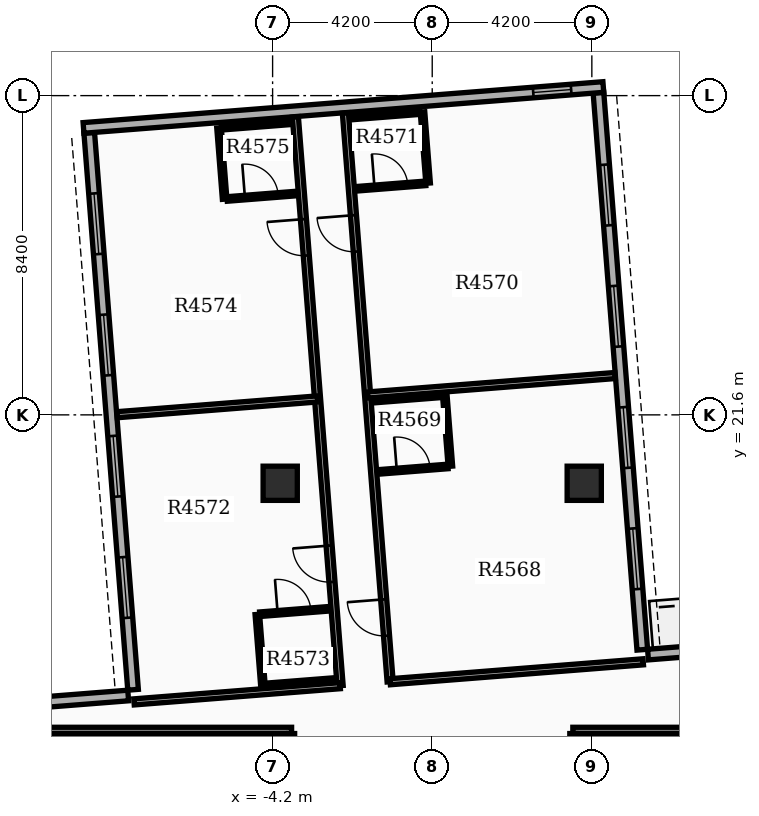
"""IFC4 building model, lengths in metres.
Left out: names, types, materials, properties, quantities, classifications, styles, units other than length and angle.
Written with IfcOpenShell. Run it as: python <this file> out.ifc"""

import sys

from ifc_helpers import new_model, si_unit, direction, frame, frame_2d, origin, origin_2d, place, context, subcontext, project, spatial, rectangle, circle, extrude, element, fill, save


model = new_model("IFC4")
c1 = context("Model", 3, precision=1e-05, world=origin(), true_north=direction((0.0, 1.0)))
c2 = subcontext(c1, "Body", "Model", "MODEL_VIEW")
j1 = project(units=[si_unit("LENGTHUNIT", "METRE"), si_unit("PLANEANGLEUNIT", "RADIAN")], contexts=[c1])
p1 = place(None, origin())
s1 = spatial("IfcSite", under=j1, at=p1, CompositionType="ELEMENT")
p2 = place(p1, origin())
s2 = spatial("IfcBuilding", under=s1, at=p2, CompositionType="ELEMENT")
p3 = place(p2, frame((0.0, 0.0, 285.0)))
s3 = spatial("IfcBuildingStorey", under=s2, at=p3, CompositionType="ELEMENT", Elevation=285.0)
for number, where, z_axis, x_axis in (
    (1, (-4.0, 19.8, 0.0), (0.0, 0.0, 1.0), (1.0, 0.0, 0.0)),
    (2, (4.0, 19.8, 0.0), (0.0, 0.0, 1.0), (1.0, 0.0, 0.0)),
):
    element("IfcColumn", number, at=place(p3, frame(where, z_axis=z_axis, x_axis=x_axis)), inside=s3, PredefinedType="COLUMN", context=c2, shape_type="SweptSolid", body=[
        extrude(circle(Radius=0.45, at=origin_2d()), origin(), (0.0, 0.0, 1.0), 3.9),
    ])
p4 = place(p3, frame((5.527, 15.421, 0.0), z_axis=(0.0, 0.0, 1.0), x_axis=(-0.078456642068, 0.996917526837, 0.0)))
e3 = element("IfcWall", 3, at=p4, inside=s3, PredefinedType="STANDARD", context=c2, shape_type="SweptSolid", body=[
    extrude(rectangle(XDim=14.7, YDim=0.28, at=frame_2d((7.35, 0.0))), origin(), (0.0, 0.0, 1.0), 3.13),
])
p5 = place(p4, frame((1.6, 0.0, 0.8)))
e4 = element("IfcOpeningElement", 4, at=p5, cuts=e3, PredefinedType="OPENING", context=c2, shape_type="SweptSolid", body=[
    extrude(rectangle(XDim=1.6, YDim=1.7, at=frame_2d((0.8, 0.85))), frame((0.0, 0.15, 0.0), z_axis=(0.0, -1.0, 0.0), x_axis=(1.0, 0.0, 0.0)), (0.0, 0.0, 1.0), 0.3),
])
p6 = place(p4, frame((4.8, 0.0, 0.8)))
e5 = element("IfcOpeningElement", 5, at=p6, cuts=e3, PredefinedType="OPENING", context=c2, shape_type="SweptSolid", body=[
    extrude(rectangle(XDim=1.6, YDim=1.7, at=frame_2d((0.8, 0.85))), frame((0.0, 0.15, 0.0), z_axis=(0.0, -1.0, 0.0), x_axis=(1.0, 0.0, 0.0)), (0.0, 0.0, 1.0), 0.3),
])
p7 = place(p4, frame((8.0, 0.0, 0.8)))
e6 = element("IfcOpeningElement", 6, at=p7, cuts=e3, PredefinedType="OPENING", context=c2, shape_type="SweptSolid", body=[
    extrude(rectangle(XDim=1.6, YDim=1.7, at=frame_2d((0.8, 0.85))), frame((0.0, 0.15, 0.0), z_axis=(0.0, -1.0, 0.0), x_axis=(1.0, 0.0, 0.0)), (0.0, 0.0, 1.0), 0.3),
])
p8 = place(p4, frame((11.2, 0.0, 0.8)))
e7 = element("IfcOpeningElement", 7, at=p8, cuts=e3, PredefinedType="OPENING", context=c2, shape_type="SweptSolid", body=[
    extrude(rectangle(XDim=1.6, YDim=1.7, at=frame_2d((0.8, 0.85))), frame((0.0, 0.15, 0.0), z_axis=(0.0, -1.0, 0.0), x_axis=(1.0, 0.0, 0.0)), (0.0, 0.0, 1.0), 0.3),
])
p9 = place(p3, frame((-9.025, 29.021, 0.0), z_axis=(0.0, 0.0, 1.0), x_axis=(0.078456642068, -0.996917526837, 0.0)))
e8 = element("IfcWall", 8, at=p9, inside=s3, PredefinedType="STANDARD", context=c2, shape_type="SweptSolid", body=[
    extrude(rectangle(XDim=14.7, YDim=0.28, at=frame_2d((7.35, 0.0))), origin(), (0.0, 0.0, 1.0), 3.13),
])
p10 = place(p9, frame((1.6, 0.0, 0.8)))
e9 = element("IfcOpeningElement", 9, at=p10, cuts=e8, PredefinedType="OPENING", context=c2, shape_type="SweptSolid", body=[
    extrude(rectangle(XDim=1.6, YDim=1.7, at=frame_2d((0.8, 0.85))), frame((0.0, 0.15, 0.0), z_axis=(0.0, -1.0, 0.0), x_axis=(1.0, 0.0, 0.0)), (0.0, 0.0, 1.0), 0.3),
])
p11 = place(p9, frame((4.8, 0.0, 0.8)))
e10 = element("IfcOpeningElement", 10, at=p11, cuts=e8, PredefinedType="OPENING", context=c2, shape_type="SweptSolid", body=[
    extrude(rectangle(XDim=1.6, YDim=1.7, at=frame_2d((0.8, 0.85))), frame((0.0, 0.15, 0.0), z_axis=(0.0, -1.0, 0.0), x_axis=(1.0, 0.0, 0.0)), (0.0, 0.0, 1.0), 0.3),
])
p12 = place(p9, frame((8.0, 0.0, 0.8)))
e11 = element("IfcOpeningElement", 11, at=p12, cuts=e8, PredefinedType="OPENING", context=c2, shape_type="SweptSolid", body=[
    extrude(rectangle(XDim=1.6, YDim=1.7, at=frame_2d((0.8, 0.85))), frame((0.0, 0.15, 0.0), z_axis=(0.0, -1.0, 0.0), x_axis=(1.0, 0.0, 0.0)), (0.0, 0.0, 1.0), 0.3),
])
p13 = place(p9, frame((11.2, 0.0, 0.8)))
e12 = element("IfcOpeningElement", 12, at=p13, cuts=e8, PredefinedType="OPENING", context=c2, shape_type="SweptSolid", body=[
    extrude(rectangle(XDim=1.6, YDim=1.7, at=frame_2d((0.8, 0.85))), frame((0.0, 0.15, 0.0), z_axis=(0.0, -1.0, 0.0), x_axis=(1.0, 0.0, 0.0)), (0.0, 0.0, 1.0), 0.3),
])
p14 = place(p3, frame((4.502, 30.226, 0.0), z_axis=(0.0, 0.0, 1.0), x_axis=(-0.996917480881, -0.078457226018, 0.0)))
e13 = element("IfcWall", 13, at=p14, inside=s3, PredefinedType="STANDARD", context=c2, shape_type="SweptSolid", body=[
    extrude(rectangle(XDim=13.72, YDim=0.28, at=frame_2d((6.86, 0.0))), origin(), (0.0, 0.0, 1.0), 3.13),
])
p15 = place(p14, frame((0.85, 0.0, 0.85)))
e14 = element("IfcOpeningElement", 14, at=p15, cuts=e13, PredefinedType="OPENING", context=c2, shape_type="SweptSolid", body=[
    extrude(rectangle(XDim=1.0, YDim=1.5, at=frame_2d((0.5, 0.75))), frame((0.0, 0.15, 0.0), z_axis=(0.0, -1.0, 0.0), x_axis=(1.0, 0.0, 0.0)), (0.0, 0.0, 1.0), 0.3),
])
p16 = place(p3, frame((11.958, 15.787, 0.0), z_axis=(0.0, 0.0, 1.0), x_axis=(-0.996916125428, -0.078474447191, 0.0)))
e15 = element("IfcWall", 15, at=p16, inside=s3, PredefinedType="STANDARD", context=c2, shape_type="SweptSolid", body=[
    extrude(rectangle(XDim=6.3, YDim=0.28, at=frame_2d((3.15, 0.0))), origin(), (0.0, 0.0, 1.0), 3.13),
])
p17 = place(p3, frame((-14.281, 13.722, 0.0), z_axis=(0.0, 0.0, 1.0), x_axis=(0.99691915642, 0.078435932851, 0.0)))
e16 = element("IfcWall", 16, at=p17, inside=s3, PredefinedType="STANDARD", context=c2, shape_type="SweptSolid", body=[
    extrude(rectangle(XDim=6.3, YDim=0.28, at=frame_2d((3.15, 0.0))), origin(), (0.0, 0.0, 1.0), 3.13),
])
p18 = place(p3, frame((-11.0, 13.3, 0.0), z_axis=(0.0, 0.0, 1.0), x_axis=(1.0, 0.0, 0.0)))
e17 = element("IfcWall", 17, at=p18, inside=s3, PredefinedType="PARTITIONING", context=c2, shape_type="SweptSolid", body=[
    extrude(rectangle(XDim=7.3, YDim=0.16, at=frame_2d((3.65, 0.0))), origin(), (0.0, 0.0, 1.0), 3.12),
])
p19 = place(p3, frame((-3.7, 11.285, 0.0), z_axis=(0.0, 0.0, 1.0), x_axis=(0.0, 1.0, 0.0)))
e18 = element("IfcWall", 18, at=p19, inside=s3, PredefinedType="PARTITIONING", context=c2, shape_type="SweptSolid", body=[
    extrude(rectangle(XDim=1.93, YDim=0.16, at=frame_2d((0.965, 0.0))), origin(), (0.0, 0.0, 1.0), 3.12),
])
p20 = place(p3, frame((3.7, 13.3, 0.0), z_axis=(0.0, 0.0, 1.0), x_axis=(1.0, 0.0, 0.0)))
e19 = element("IfcWall", 19, at=p20, inside=s3, PredefinedType="PARTITIONING", context=c2, shape_type="SweptSolid", body=[
    extrude(rectangle(XDim=7.3, YDim=0.16, at=frame_2d((3.65, 0.0))), origin(), (0.0, 0.0, 1.0), 3.12),
])
p21 = place(p3, frame((3.7, 11.285, 0.0), z_axis=(0.0, 0.0, 1.0), x_axis=(0.0, 1.0, 0.0)))
e20 = element("IfcWall", 20, at=p21, inside=s3, PredefinedType="PARTITIONING", context=c2, shape_type="SweptSolid", body=[
    extrude(rectangle(XDim=1.93, YDim=0.16, at=frame_2d((0.965, 0.0))), origin(), (0.0, 0.0, 1.0), 3.12),
])
p22 = place(p3, frame((-1.107, 14.578, 0.0), z_axis=(0.0, 0.0, 1.0), x_axis=(-0.078453666116, 0.996917761038, 0.0)))
e21 = element("IfcWall", 21, at=p22, inside=s3, PredefinedType="PARTITIONING", context=c2, shape_type="SweptSolid", body=[
    extrude(rectangle(XDim=15.012, YDim=0.16, at=frame_2d((7.506, 0.0))), origin(), (0.0, 0.0, 1.0), 3.12),
])
p23 = place(p22, frame((1.214, 0.0, 0.0)))
e22 = element("IfcOpeningElement", 22, at=p23, cuts=e21, PredefinedType="OPENING", context=c2, shape_type="SweptSolid", body=[
    extrude(rectangle(XDim=0.96, YDim=2.15, at=frame_2d((0.48, 1.075))), frame((0.0, 0.09, 0.0), z_axis=(0.0, -1.0, 0.0), x_axis=(1.0, 0.0, 0.0)), (0.0, 0.0, 1.0), 0.18),
])
p24 = place(p22, frame((11.353, 0.0, 0.0)))
e23 = element("IfcOpeningElement", 23, at=p24, cuts=e21, PredefinedType="OPENING", context=c2, shape_type="SweptSolid", body=[
    extrude(rectangle(XDim=0.96, YDim=2.15, at=frame_2d((0.48, 1.075))), frame((0.0, 0.09, 0.0), z_axis=(0.0, -1.0, 0.0), x_axis=(1.0, 0.0, 0.0)), (0.0, 0.0, 1.0), 0.18),
])
p25 = place(p3, frame((-1.107, 14.578, 0.0), z_axis=(0.0, 0.0, 1.0), x_axis=(0.996916608894, 0.07846830514, 0.0)))
e24 = element("IfcWall", 24, at=p25, inside=s3, PredefinedType="PARTITIONING", context=c2, shape_type="SweptSolid", body=[
    extrude(rectangle(XDim=6.68, YDim=0.16, at=frame_2d((3.34, 0.0))), origin(), (0.0, 0.0, 1.0), 3.12),
])
p26 = place(p3, frame((-1.701, 22.123, 0.0), z_axis=(0.0, 0.0, 1.0), x_axis=(0.996917719405, 0.07845419515, 0.0)))
e25 = element("IfcWall", 25, at=p26, inside=s3, PredefinedType="PARTITIONING", context=c2, shape_type="SweptSolid", body=[
    extrude(rectangle(XDim=6.532, YDim=0.16, at=frame_2d((3.266, 0.0))), origin(), (0.0, 0.0, 1.0), 3.12),
])
p27 = place(p3, frame((-1.401, 20.1, 0.0), z_axis=(0.0, 0.0, 1.0), x_axis=(0.996916400774, 0.0784709492, 0.0)))
e26 = element("IfcWall", 26, at=p27, inside=s3, PredefinedType="PARTITIONING", context=c2, shape_type="SweptSolid", body=[
    extrude(rectangle(XDim=1.82, YDim=0.12, at=frame_2d((0.91, 0.0))), origin(), (0.0, 0.0, 1.0), 3.12),
])
p28 = place(p27, frame((0.47, 0.0, 0.0)))
e27 = element("IfcOpeningElement", 27, at=p28, cuts=e26, PredefinedType="OPENING", context=c2, shape_type="SweptSolid", body=[
    extrude(rectangle(XDim=0.88, YDim=2.1, at=frame_2d((0.44, 1.05))), frame((0.0, 0.07, 0.0), z_axis=(0.0, -1.0, 0.0), x_axis=(1.0, 0.0, 0.0)), (0.0, 0.0, 1.0), 0.14),
])
p29 = place(p3, frame((-1.549, 21.974, 0.0), z_axis=(0.0, 0.0, 1.0), x_axis=(0.996915574626, 0.078481444107, 0.0)))
e28 = element("IfcWall", 28, at=p29, inside=s3, PredefinedType="PARTITIONING", context=c2, shape_type="SweptSolid", body=[
    extrude(rectangle(XDim=1.82, YDim=0.12, at=frame_2d((0.91, 0.0))), origin(), (0.0, 0.0, 1.0), 3.12),
])
p30 = place(p3, frame((0.478, 20.248, 0.0), z_axis=(0.0, 0.0, 1.0), x_axis=(-0.07843418698, 0.996919293781, 0.0)))
e29 = element("IfcWall", 29, at=p30, inside=s3, PredefinedType="PARTITIONING", context=c2, shape_type="SweptSolid", body=[
    extrude(rectangle(XDim=1.88, YDim=0.12, at=frame_2d((0.94, 0.0))), origin(), (0.0, 0.0, 1.0), 3.12),
])
p31 = place(p3, frame((-1.988, 27.549, 0.0), z_axis=(0.0, 0.0, 1.0), x_axis=(0.996916400774, 0.0784709492, 0.0)))
e30 = element("IfcWall", 30, at=p31, inside=s3, PredefinedType="PARTITIONING", context=c2, shape_type="SweptSolid", body=[
    extrude(rectangle(XDim=1.82, YDim=0.12, at=frame_2d((0.91, 0.0))), origin(), (0.0, 0.0, 1.0), 3.12),
])
p32 = place(p31, frame((0.47, 0.0, 0.0)))
e31 = element("IfcOpeningElement", 31, at=p32, cuts=e30, PredefinedType="OPENING", context=c2, shape_type="SweptSolid", body=[
    extrude(rectangle(XDim=0.88, YDim=2.1, at=frame_2d((0.44, 1.05))), frame((0.0, 0.07, 0.0), z_axis=(0.0, -1.0, 0.0), x_axis=(1.0, 0.0, 0.0)), (0.0, 0.0, 1.0), 0.14),
])
p33 = place(p3, frame((-2.135, 29.423, 0.0), z_axis=(0.0, 0.0, 1.0), x_axis=(0.996915574626, 0.078481444107, 0.0)))
e32 = element("IfcWall", 32, at=p33, inside=s3, PredefinedType="PARTITIONING", context=c2, shape_type="SweptSolid", body=[
    extrude(rectangle(XDim=1.82, YDim=0.12, at=frame_2d((0.91, 0.0))), origin(), (0.0, 0.0, 1.0), 3.12),
])
p34 = place(p3, frame((-0.108, 27.697, 0.0), z_axis=(0.0, 0.0, 1.0), x_axis=(-0.078444342213, 0.99691849475, 0.0)))
e33 = element("IfcWall", 33, at=p34, inside=s3, PredefinedType="PARTITIONING", context=c2, shape_type="SweptSolid", body=[
    extrude(rectangle(XDim=1.88, YDim=0.12, at=frame_2d((0.94, 0.0))), origin(), (0.0, 0.0, 1.0), 3.12),
])
p35 = place(p3, frame((-2.423, 14.475, 0.0), z_axis=(0.0, 0.0, 1.0), x_axis=(-0.078469829183, 0.996916488934, 0.0)))
e34 = element("IfcWall", 34, at=p35, inside=s3, PredefinedType="PARTITIONING", context=c2, shape_type="SweptSolid", body=[
    extrude(rectangle(XDim=15.012, YDim=0.16, at=frame_2d((7.506, 0.0))), origin(), (0.0, 0.0, 1.0), 3.12),
])
p36 = place(p35, frame((2.737, 0.0, 0.0)))
e35 = element("IfcOpeningElement", 35, at=p36, cuts=e34, PredefinedType="OPENING", context=c2, shape_type="SweptSolid", body=[
    extrude(rectangle(XDim=0.96, YDim=2.15, at=frame_2d((0.48, 1.075))), frame((0.0, 0.09, 0.0), z_axis=(0.0, -1.0, 0.0), x_axis=(1.0, 0.0, 0.0)), (0.0, 0.0, 1.0), 0.18),
])
p37 = place(p35, frame((11.353, 0.0, 0.0)))
e36 = element("IfcOpeningElement", 36, at=p37, cuts=e34, PredefinedType="OPENING", context=c2, shape_type="SweptSolid", body=[
    extrude(rectangle(XDim=0.96, YDim=2.15, at=frame_2d((0.48, 1.075))), frame((0.0, 0.09, 0.0), z_axis=(0.0, -1.0, 0.0), x_axis=(1.0, 0.0, 0.0)), (0.0, 0.0, 1.0), 0.18),
])
p38 = place(p3, frame((-2.423, 14.475, 0.0), z_axis=(0.0, 0.0, 1.0), x_axis=(-0.996914804862, -0.078491221469, 0.0)))
e37 = element("IfcWall", 37, at=p38, inside=s3, PredefinedType="PARTITIONING", context=c2, shape_type="SweptSolid", body=[
    extrude(rectangle(XDim=5.44, YDim=0.16, at=frame_2d((2.72, 0.0))), origin(), (0.0, 0.0, 1.0), 3.12),
])
p39 = place(p3, frame((-3.017, 22.019, 0.0), z_axis=(0.0, 0.0, 1.0), x_axis=(-0.996916125428, -0.078474447191, 0.0)))
e38 = element("IfcWall", 38, at=p39, inside=s3, PredefinedType="PARTITIONING", context=c2, shape_type="SweptSolid", body=[
    extrude(rectangle(XDim=5.292, YDim=0.16, at=frame_2d((2.646, 0.0))), origin(), (0.0, 0.0, 1.0), 3.12),
])
p40 = place(p3, frame((-4.537, 16.354, 0.0), z_axis=(0.0, 0.0, 1.0), x_axis=(0.996915574626, 0.078481444107, 0.0)))
e39 = element("IfcWall", 39, at=p40, inside=s3, PredefinedType="PARTITIONING", context=c2, shape_type="SweptSolid", body=[
    extrude(rectangle(XDim=1.82, YDim=0.12, at=frame_2d((0.91, 0.0))), origin(), (0.0, 0.0, 1.0), 3.12),
])
p41 = place(p40, frame((0.47, 0.0, 0.0)))
e40 = element("IfcOpeningElement", 40, at=p41, cuts=e39, PredefinedType="OPENING", context=c2, shape_type="SweptSolid", body=[
    extrude(rectangle(XDim=0.88, YDim=2.1, at=frame_2d((0.44, 1.05))), frame((0.0, 0.07, 0.0), z_axis=(0.0, -1.0, 0.0), x_axis=(1.0, 0.0, 0.0)), (0.0, 0.0, 1.0), 0.14),
])
p42 = place(p3, frame((-4.39, 14.48, 0.0), z_axis=(0.0, 0.0, 1.0), x_axis=(0.996916400774, 0.0784709492, 0.0)))
e41 = element("IfcWall", 41, at=p42, inside=s3, PredefinedType="PARTITIONING", context=c2, shape_type="SweptSolid", body=[
    extrude(rectangle(XDim=1.82, YDim=0.12, at=frame_2d((0.91, 0.0))), origin(), (0.0, 0.0, 1.0), 3.12),
])
p43 = place(p3, frame((-4.454, 14.475, 0.0), z_axis=(0.0, 0.0, 1.0), x_axis=(-0.07843418698, 0.996919293781, 0.0)))
e42 = element("IfcWall", 42, at=p43, inside=s3, PredefinedType="PARTITIONING", context=c2, shape_type="SweptSolid", body=[
    extrude(rectangle(XDim=1.88, YDim=0.12, at=frame_2d((0.94, 0.0))), origin(), (0.0, 0.0, 1.0), 3.12),
])
p44 = place(p3, frame((-5.397, 27.281, 0.0), z_axis=(0.0, 0.0, 1.0), x_axis=(0.996916400774, 0.0784709492, 0.0)))
e43 = element("IfcWall", 43, at=p44, inside=s3, PredefinedType="PARTITIONING", context=c2, shape_type="SweptSolid", body=[
    extrude(rectangle(XDim=1.82, YDim=0.12, at=frame_2d((0.91, 0.0))), origin(), (0.0, 0.0, 1.0), 3.12),
])
p45 = place(p44, frame((0.47, 0.0, 0.0)))
e44 = element("IfcOpeningElement", 44, at=p45, cuts=e43, PredefinedType="OPENING", context=c2, shape_type="SweptSolid", body=[
    extrude(rectangle(XDim=0.88, YDim=2.1, at=frame_2d((0.44, 1.05))), frame((0.0, 0.07, 0.0), z_axis=(0.0, -1.0, 0.0), x_axis=(1.0, 0.0, 0.0)), (0.0, 0.0, 1.0), 0.14),
])
p46 = place(p3, frame((-5.545, 29.155, 0.0), z_axis=(0.0, 0.0, 1.0), x_axis=(0.996916400774, 0.0784709492, 0.0)))
e45 = element("IfcWall", 45, at=p46, inside=s3, PredefinedType="PARTITIONING", context=c2, shape_type="SweptSolid", body=[
    extrude(rectangle(XDim=1.82, YDim=0.12, at=frame_2d((0.91, 0.0))), origin(), (0.0, 0.0, 1.0), 3.12),
])
p47 = place(p3, frame((-5.462, 27.275, 0.0), z_axis=(0.0, 0.0, 1.0), x_axis=(-0.078424034367, 0.996920092502, 0.0)))
e46 = element("IfcWall", 46, at=p47, inside=s3, PredefinedType="PARTITIONING", context=c2, shape_type="SweptSolid", body=[
    extrude(rectangle(XDim=1.88, YDim=0.12, at=frame_2d((0.94, 0.0))), origin(), (0.0, 0.0, 1.0), 3.12),
])
p48 = place(p5, origin())
e47 = element("IfcWindow", 47, at=p48, inside=s3, PartitioningType="SINGLE_PANEL", PredefinedType="WINDOW", context=c2, shape_type="SweptSolid", body=[
    extrude(rectangle(XDim=1.6, YDim=1.7, at=frame_2d((0.8, 0.85))), frame((0.0, 0.03, 0.0), z_axis=(0.0, -1.0, 0.0), x_axis=(1.0, 0.0, 0.0)), (0.0, 0.0, 1.0), 0.06),
])
fill(e4, e47)
p49 = place(p6, origin())
e48 = element("IfcWindow", 48, at=p49, inside=s3, PartitioningType="SINGLE_PANEL", PredefinedType="WINDOW", context=c2, shape_type="SweptSolid", body=[
    extrude(rectangle(XDim=1.6, YDim=1.7, at=frame_2d((0.8, 0.85))), frame((0.0, 0.03, 0.0), z_axis=(0.0, -1.0, 0.0), x_axis=(1.0, 0.0, 0.0)), (0.0, 0.0, 1.0), 0.06),
])
fill(e5, e48)
p50 = place(p7, origin())
e49 = element("IfcWindow", 49, at=p50, inside=s3, PartitioningType="SINGLE_PANEL", PredefinedType="WINDOW", context=c2, shape_type="SweptSolid", body=[
    extrude(rectangle(XDim=1.6, YDim=1.7, at=frame_2d((0.8, 0.85))), frame((0.0, 0.03, 0.0), z_axis=(0.0, -1.0, 0.0), x_axis=(1.0, 0.0, 0.0)), (0.0, 0.0, 1.0), 0.06),
])
fill(e6, e49)
p51 = place(p8, origin())
e50 = element("IfcWindow", 50, at=p51, inside=s3, PartitioningType="SINGLE_PANEL", PredefinedType="WINDOW", context=c2, shape_type="SweptSolid", body=[
    extrude(rectangle(XDim=1.6, YDim=1.7, at=frame_2d((0.8, 0.85))), frame((0.0, 0.03, 0.0), z_axis=(0.0, -1.0, 0.0), x_axis=(1.0, 0.0, 0.0)), (0.0, 0.0, 1.0), 0.06),
])
fill(e7, e50)
p52 = place(p10, origin())
e51 = element("IfcWindow", 51, at=p52, inside=s3, PartitioningType="SINGLE_PANEL", PredefinedType="WINDOW", context=c2, shape_type="SweptSolid", body=[
    extrude(rectangle(XDim=1.6, YDim=1.7, at=frame_2d((0.8, 0.85))), frame((0.0, 0.03, 0.0), z_axis=(0.0, -1.0, 0.0), x_axis=(1.0, 0.0, 0.0)), (0.0, 0.0, 1.0), 0.06),
])
fill(e9, e51)
p53 = place(p11, origin())
e52 = element("IfcWindow", 52, at=p53, inside=s3, PartitioningType="SINGLE_PANEL", PredefinedType="WINDOW", context=c2, shape_type="SweptSolid", body=[
    extrude(rectangle(XDim=1.6, YDim=1.7, at=frame_2d((0.8, 0.85))), frame((0.0, 0.03, 0.0), z_axis=(0.0, -1.0, 0.0), x_axis=(1.0, 0.0, 0.0)), (0.0, 0.0, 1.0), 0.06),
])
fill(e10, e52)
p54 = place(p12, origin())
e53 = element("IfcWindow", 53, at=p54, inside=s3, PartitioningType="SINGLE_PANEL", PredefinedType="WINDOW", context=c2, shape_type="SweptSolid", body=[
    extrude(rectangle(XDim=1.6, YDim=1.7, at=frame_2d((0.8, 0.85))), frame((0.0, 0.03, 0.0), z_axis=(0.0, -1.0, 0.0), x_axis=(1.0, 0.0, 0.0)), (0.0, 0.0, 1.0), 0.06),
])
fill(e11, e53)
p55 = place(p13, origin())
e54 = element("IfcWindow", 54, at=p55, inside=s3, PartitioningType="SINGLE_PANEL", PredefinedType="WINDOW", context=c2, shape_type="SweptSolid", body=[
    extrude(rectangle(XDim=1.6, YDim=1.7, at=frame_2d((0.8, 0.85))), frame((0.0, 0.03, 0.0), z_axis=(0.0, -1.0, 0.0), x_axis=(1.0, 0.0, 0.0)), (0.0, 0.0, 1.0), 0.06),
])
fill(e12, e54)
p56 = place(p15, origin())
e55 = element("IfcWindow", 55, at=p56, inside=s3, PartitioningType="SINGLE_PANEL", PredefinedType="WINDOW", context=c2, shape_type="SweptSolid", body=[
    extrude(rectangle(XDim=1.0, YDim=1.5, at=frame_2d((0.5, 0.75))), frame((0.0, 0.03, 0.0), z_axis=(0.0, -1.0, 0.0), x_axis=(1.0, 0.0, 0.0)), (0.0, 0.0, 1.0), 0.06),
])
fill(e14, e55)
p57 = place(p23, origin())
e56 = element("IfcDoor", 56, at=p57, inside=s3, OperationType="SINGLE_SWING_RIGHT", PredefinedType="DOOR", context=c2, shape_type="SweptSolid", body=[
    extrude(rectangle(XDim=0.96, YDim=2.15, at=frame_2d((0.48, 1.075))), frame((0.0, 0.025, 0.0), z_axis=(0.0, -1.0, 0.0), x_axis=(1.0, 0.0, 0.0)), (0.0, 0.0, 1.0), 0.05),
])
fill(e22, e56)
p58 = place(p28, origin())
e57 = element("IfcDoor", 57, at=p58, inside=s3, OperationType="SINGLE_SWING_LEFT", PredefinedType="DOOR", context=c2, shape_type="SweptSolid", body=[
    extrude(rectangle(XDim=0.88, YDim=2.1, at=frame_2d((0.44, 1.05))), frame((0.0, 0.025, 0.0), z_axis=(0.0, -1.0, 0.0), x_axis=(1.0, 0.0, 0.0)), (0.0, 0.0, 1.0), 0.05),
])
fill(e27, e57)
p59 = place(p24, origin())
e58 = element("IfcDoor", 58, at=p59, inside=s3, OperationType="SINGLE_SWING_RIGHT", PredefinedType="DOOR", context=c2, shape_type="SweptSolid", body=[
    extrude(rectangle(XDim=0.96, YDim=2.15, at=frame_2d((0.48, 1.075))), frame((0.0, 0.025, 0.0), z_axis=(0.0, -1.0, 0.0), x_axis=(1.0, 0.0, 0.0)), (0.0, 0.0, 1.0), 0.05),
])
fill(e23, e58)
p60 = place(p32, origin())
e59 = element("IfcDoor", 59, at=p60, inside=s3, OperationType="SINGLE_SWING_LEFT", PredefinedType="DOOR", context=c2, shape_type="SweptSolid", body=[
    extrude(rectangle(XDim=0.88, YDim=2.1, at=frame_2d((0.44, 1.05))), frame((0.0, 0.025, 0.0), z_axis=(0.0, -1.0, 0.0), x_axis=(1.0, 0.0, 0.0)), (0.0, 0.0, 1.0), 0.05),
])
fill(e31, e59)
p61 = place(p36, origin())
e60 = element("IfcDoor", 60, at=p61, inside=s3, OperationType="SINGLE_SWING_RIGHT", PredefinedType="DOOR", context=c2, shape_type="SweptSolid", body=[
    extrude(rectangle(XDim=0.96, YDim=2.15, at=frame_2d((0.48, 1.075))), frame((0.0, 0.025, 0.0), z_axis=(0.0, -1.0, 0.0), x_axis=(1.0, 0.0, 0.0)), (0.0, 0.0, 1.0), 0.05),
])
fill(e35, e60)
p62 = place(p41, origin())
e61 = element("IfcDoor", 61, at=p62, inside=s3, OperationType="SINGLE_SWING_LEFT", PredefinedType="DOOR", context=c2, shape_type="SweptSolid", body=[
    extrude(rectangle(XDim=0.88, YDim=2.1, at=frame_2d((0.44, 1.05))), frame((0.0, 0.025, 0.0), z_axis=(0.0, -1.0, 0.0), x_axis=(1.0, 0.0, 0.0)), (0.0, 0.0, 1.0), 0.05),
])
fill(e40, e61)
p63 = place(p37, origin())
e62 = element("IfcDoor", 62, at=p63, inside=s3, OperationType="SINGLE_SWING_RIGHT", PredefinedType="DOOR", context=c2, shape_type="SweptSolid", body=[
    extrude(rectangle(XDim=0.96, YDim=2.15, at=frame_2d((0.48, 1.075))), frame((0.0, 0.025, 0.0), z_axis=(0.0, -1.0, 0.0), x_axis=(1.0, 0.0, 0.0)), (0.0, 0.0, 1.0), 0.05),
])
fill(e36, e62)
p64 = place(p45, origin())
e63 = element("IfcDoor", 63, at=p64, inside=s3, OperationType="SINGLE_SWING_LEFT", PredefinedType="DOOR", context=c2, shape_type="SweptSolid", body=[
    extrude(rectangle(XDim=0.88, YDim=2.1, at=frame_2d((0.44, 1.05))), frame((0.0, 0.025, 0.0), z_axis=(0.0, -1.0, 0.0), x_axis=(1.0, 0.0, 0.0)), (0.0, 0.0, 1.0), 0.05),
])
fill(e44, e63)
save(model, sys.argv[1])
